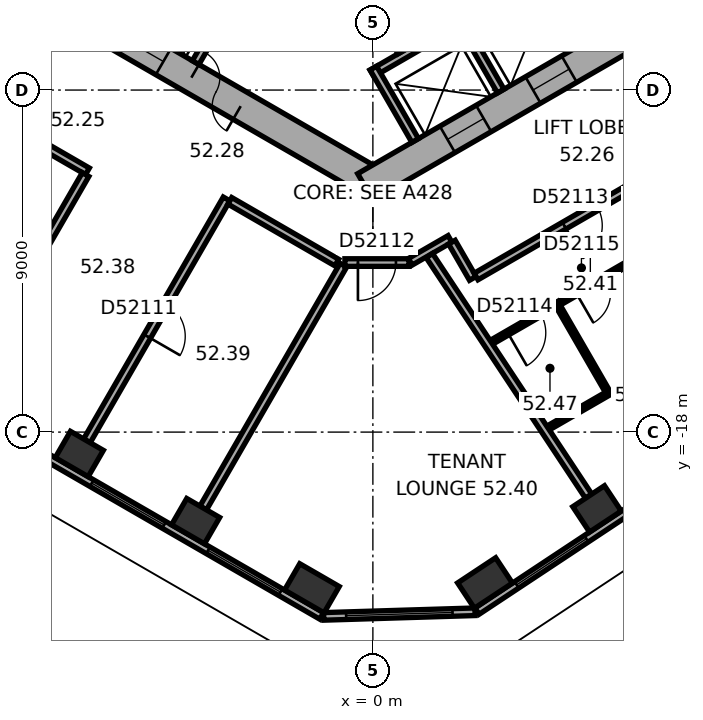
"""IFC4 building model, lengths in metres.
Left out: names, types, materials, properties, quantities, classifications, styles, units other than length and angle.
Written with IfcOpenShell. Run it as: python <this file> out.ifc"""

import sys

from ifc_helpers import new_model, si_unit, direction, frame, frame_2d, origin, origin_2d, place, context, subcontext, project, spatial, rectangle, extrude, element, fill, save


model = new_model("IFC4")
c1 = context("Model", 3, precision=1e-05, world=origin(), true_north=direction((0.0, 1.0)))
c2 = subcontext(c1, "Body", "Model", "MODEL_VIEW")
j1 = project(units=[si_unit("LENGTHUNIT", "METRE"), si_unit("PLANEANGLEUNIT", "RADIAN")], contexts=[c1])
p1 = place(None, origin())
s1 = spatial("IfcSite", under=j1, at=p1, CompositionType="ELEMENT")
p2 = place(p1, origin())
s2 = spatial("IfcBuilding", under=s1, at=p2, CompositionType="ELEMENT")
p3 = place(p2, frame((0.0, 0.0, 210.6)))
s3 = spatial("IfcBuildingStorey", under=s2, at=p3, CompositionType="ELEMENT", Elevation=210.6)
for number, where, z_axis, x_axis in (
    (1, (-7.725, -18.576, 0.0), (0.0, 0.0, 1.0), (0.866, -0.5, 0.0)),
    (2, (-4.665, -20.343, 0.0), (0.0, 0.0, 1.0), (0.866, -0.5, 0.0)),
):
    element("IfcColumn", number, at=place(p3, frame(where, z_axis=z_axis, x_axis=x_axis)), inside=s3, PredefinedType="COLUMN", context=c2, shape_type="SweptSolid", body=[
        extrude(rectangle(XDim=1.0, YDim=0.8, at=origin_2d()), origin(), (0.0, 0.0, 1.0), 3.7),
    ])
for number, where, z_axis, x_axis in (
    (3, (-1.604, -22.11, 0.0), (0.0, 0.0, 1.0), (0.866, -0.5, 0.0)),
    (4, (2.951, -21.971, 0.0), (0.0, 0.0, 1.0), (0.834, 0.552, 0.0)),
):
    element("IfcColumn", number, at=place(p3, frame(where, z_axis=z_axis, x_axis=x_axis)), inside=s3, PredefinedType="COLUMN", context=c2, shape_type="SweptSolid", body=[
        extrude(rectangle(XDim=1.2, YDim=0.8, at=origin_2d()), origin(), (0.0, 0.0, 1.0), 3.7),
    ])
p4 = place(p3, frame((5.898, -20.021, 0.0), z_axis=(0.0, 0.0, 1.0), x_axis=(0.833885822067, 0.551936985312, 0.0)))
e5 = element("IfcColumn", 5, at=p4, inside=s3, PredefinedType="COLUMN", context=c2, shape_type="SweptSolid", body=[
    extrude(rectangle(XDim=1.0, YDim=0.8, at=origin_2d()), origin(), (0.0, 0.0, 1.0), 3.7),
])
p5 = place(p3, frame((-10.1, -5.6, 0.0), z_axis=(0.0, 0.0, 1.0), x_axis=(0.866023897231, -0.500002609418, 0.0)))
e6 = element("IfcWall", 6, at=p5, inside=s3, PredefinedType="SHEAR", context=c2, shape_type="SweptSolid", body=[
    extrude(rectangle(XDim=11.894, YDim=0.8, at=frame_2d((5.947, 0.0))), origin(), (0.0, 0.0, 1.0), 3.7),
])
p6 = place(p5, frame((6.147, 0.0, 0.0)))
e7 = element("IfcOpeningElement", 7, at=p6, cuts=e6, PredefinedType="OPENING", context=c2, shape_type="SweptSolid", body=[
    extrude(rectangle(XDim=1.5, YDim=2.1, at=frame_2d((0.75, 1.05))), frame((0.0, 0.41, 0.0), z_axis=(0.0, -1.0, 0.0), x_axis=(1.0, 0.0, 0.0)), (0.0, 0.0, 1.0), 0.82),
])
p7 = place(p5, frame((1.597, 0.0, 0.0)))
e8 = element("IfcOpeningElement", 8, at=p7, cuts=e6, PredefinedType="OPENING", context=c2, shape_type="SweptSolid", body=[
    extrude(rectangle(XDim=1.1, YDim=2.1, at=frame_2d((0.55, 1.05))), frame((0.0, 0.41, 0.0), z_axis=(0.0, -1.0, 0.0), x_axis=(1.0, 0.0, 0.0)), (0.0, 0.0, 1.0), 0.82),
])
p8 = place(p5, frame((4.197, 0.0, 0.0)))
e9 = element("IfcOpeningElement", 9, at=p8, cuts=e6, PredefinedType="OPENING", context=c2, shape_type="SweptSolid", body=[
    extrude(rectangle(XDim=1.1, YDim=2.1, at=frame_2d((0.55, 1.05))), frame((0.0, 0.41, 0.0), z_axis=(0.0, -1.0, 0.0), x_axis=(1.0, 0.0, 0.0)), (0.0, 0.0, 1.0), 0.82),
])
p9 = place(p3, frame((-0.2, -11.547, 0.0), z_axis=(0.0, 0.0, 1.0), x_axis=(0.866023897231, 0.500002609418, 0.0)))
e10 = element("IfcWall", 10, at=p9, inside=s3, PredefinedType="SHEAR", context=c2, shape_type="SweptSolid", body=[
    extrude(rectangle(XDim=11.894, YDim=0.8, at=frame_2d((5.947, 0.0))), origin(), (0.0, 0.0, 1.0), 3.7),
])
p10 = place(p9, frame((2.497, 0.0, 0.0)))
e11 = element("IfcOpeningElement", 11, at=p10, cuts=e10, PredefinedType="OPENING", context=c2, shape_type="SweptSolid", body=[
    extrude(rectangle(XDim=1.1, YDim=2.1, at=frame_2d((0.55, 1.05))), frame((0.0, 0.41, 0.0), z_axis=(0.0, -1.0, 0.0), x_axis=(1.0, 0.0, 0.0)), (0.0, 0.0, 1.0), 0.82),
])
p11 = place(p9, frame((5.097, 0.0, 0.0)))
e12 = element("IfcOpeningElement", 12, at=p11, cuts=e10, PredefinedType="OPENING", context=c2, shape_type="SweptSolid", body=[
    extrude(rectangle(XDim=1.1, YDim=2.1, at=frame_2d((0.55, 1.05))), frame((0.0, 0.41, 0.0), z_axis=(0.0, -1.0, 0.0), x_axis=(1.0, 0.0, 0.0)), (0.0, 0.0, 1.0), 0.82),
])
p12 = place(p9, frame((7.697, 0.0, 0.0)))
e13 = element("IfcOpeningElement", 13, at=p12, cuts=e10, PredefinedType="OPENING", context=c2, shape_type="SweptSolid", body=[
    extrude(rectangle(XDim=1.1, YDim=2.1, at=frame_2d((0.55, 1.05))), frame((0.0, 0.41, 0.0), z_axis=(0.0, -1.0, 0.0), x_axis=(1.0, 0.0, 0.0)), (0.0, 0.0, 1.0), 0.82),
])
p13 = place(p3, frame((-17.664, -13.415, 0.0), z_axis=(0.0, 0.0, 1.0), x_axis=(0.866026555358, -0.49999800541, 0.0)))
e14 = element("IfcWall", 14, at=p13, inside=s3, PredefinedType="STANDARD", context=c2, shape_type="SweptSolid", body=[
    extrude(rectangle(XDim=18.841, YDim=0.2, at=frame_2d((9.421, 0.0))), origin(), (0.0, 0.0, 1.0), 3.7),
])
p14 = place(p13, frame((1.254, 0.0, 0.9)))
e15 = element("IfcOpeningElement", 15, at=p14, cuts=e14, PredefinedType="OPENING", context=c2, shape_type="SweptSolid", body=[
    extrude(rectangle(XDim=2.2, YDim=2.0, at=frame_2d((1.1, 1.0))), frame((0.0, 0.11, 0.0), z_axis=(0.0, -1.0, 0.0), x_axis=(1.0, 0.0, 0.0)), (0.0, 0.0, 1.0), 0.22),
])
p15 = place(p13, frame((4.788, 0.0, 0.9)))
e16 = element("IfcOpeningElement", 16, at=p15, cuts=e14, PredefinedType="OPENING", context=c2, shape_type="SweptSolid", body=[
    extrude(rectangle(XDim=2.2, YDim=2.0, at=frame_2d((1.1, 1.0))), frame((0.0, 0.11, 0.0), z_axis=(0.0, -1.0, 0.0), x_axis=(1.0, 0.0, 0.0)), (0.0, 0.0, 1.0), 0.22),
])
p16 = place(p13, frame((8.322, 0.0, 0.9)))
e17 = element("IfcOpeningElement", 17, at=p16, cuts=e14, PredefinedType="OPENING", context=c2, shape_type="SweptSolid", body=[
    extrude(rectangle(XDim=2.2, YDim=2.0, at=frame_2d((1.1, 1.0))), frame((0.0, 0.11, 0.0), z_axis=(0.0, -1.0, 0.0), x_axis=(1.0, 0.0, 0.0)), (0.0, 0.0, 1.0), 0.22),
])
p17 = place(p13, frame((11.855, 0.0, 0.9)))
e18 = element("IfcOpeningElement", 18, at=p17, cuts=e14, PredefinedType="OPENING", context=c2, shape_type="SweptSolid", body=[
    extrude(rectangle(XDim=2.2, YDim=2.0, at=frame_2d((1.1, 1.0))), frame((0.0, 0.11, 0.0), z_axis=(0.0, -1.0, 0.0), x_axis=(1.0, 0.0, 0.0)), (0.0, 0.0, 1.0), 0.22),
])
p18 = place(p13, frame((15.389, 0.0, 0.9)))
e19 = element("IfcOpeningElement", 19, at=p18, cuts=e14, PredefinedType="OPENING", context=c2, shape_type="SweptSolid", body=[
    extrude(rectangle(XDim=2.2, YDim=2.0, at=frame_2d((1.1, 1.0))), frame((0.0, 0.11, 0.0), z_axis=(0.0, -1.0, 0.0), x_axis=(1.0, 0.0, 0.0)), (0.0, 0.0, 1.0), 0.22),
])
p19 = place(p3, frame((-1.294, -22.849, 0.0), z_axis=(0.0, 0.0, 1.0), x_axis=(0.999533952558, 0.030526671678, 0.0)))
e20 = element("IfcWall", 20, at=p19, inside=s3, PredefinedType="STANDARD", context=c2, shape_type="SweptSolid", body=[
    extrude(rectangle(XDim=3.983, YDim=0.2, at=frame_2d((1.991, 0.0))), origin(), (0.0, 0.0, 1.0), 3.7),
])
p20 = place(p19, frame((0.591, 0.0, 0.9)))
e21 = element("IfcOpeningElement", 21, at=p20, cuts=e20, PredefinedType="OPENING", context=c2, shape_type="SweptSolid", body=[
    extrude(rectangle(XDim=2.8, YDim=2.0, at=frame_2d((1.4, 1.0))), frame((0.0, 0.11, 0.0), z_axis=(0.0, -1.0, 0.0), x_axis=(1.0, 0.0, 0.0)), (0.0, 0.0, 1.0), 0.22),
])
p21 = place(p3, frame((2.739, -22.711, 0.0), z_axis=(0.0, 0.0, 1.0), x_axis=(0.833885723098, 0.551937134838, 0.0)))
e22 = element("IfcWall", 22, at=p21, inside=s3, PredefinedType="STANDARD", context=c2, shape_type="SweptSolid", body=[
    extrude(rectangle(XDim=18.841, YDim=0.2, at=frame_2d((9.421, 0.0))), origin(), (0.0, 0.0, 1.0), 3.7),
])
p22 = place(p21, frame((1.252, 0.0, 0.9)))
e23 = element("IfcOpeningElement", 23, at=p22, cuts=e22, PredefinedType="OPENING", context=c2, shape_type="SweptSolid", body=[
    extrude(rectangle(XDim=2.2, YDim=2.0, at=frame_2d((1.1, 1.0))), frame((0.0, 0.11, 0.0), z_axis=(0.0, -1.0, 0.0), x_axis=(1.0, 0.0, 0.0)), (0.0, 0.0, 1.0), 0.22),
])
p23 = place(p21, frame((4.786, 0.0, 0.9)))
e24 = element("IfcOpeningElement", 24, at=p23, cuts=e22, PredefinedType="OPENING", context=c2, shape_type="SweptSolid", body=[
    extrude(rectangle(XDim=2.2, YDim=2.0, at=frame_2d((1.1, 1.0))), frame((0.0, 0.11, 0.0), z_axis=(0.0, -1.0, 0.0), x_axis=(1.0, 0.0, 0.0)), (0.0, 0.0, 1.0), 0.22),
])
p24 = place(p21, frame((8.32, 0.0, 0.9)))
e25 = element("IfcOpeningElement", 25, at=p24, cuts=e22, PredefinedType="OPENING", context=c2, shape_type="SweptSolid", body=[
    extrude(rectangle(XDim=2.2, YDim=2.0, at=frame_2d((1.1, 1.0))), frame((0.0, 0.11, 0.0), z_axis=(0.0, -1.0, 0.0), x_axis=(1.0, 0.0, 0.0)), (0.0, 0.0, 1.0), 0.22),
])
p25 = place(p21, frame((11.854, 0.0, 0.9)))
e26 = element("IfcOpeningElement", 26, at=p25, cuts=e22, PredefinedType="OPENING", context=c2, shape_type="SweptSolid", body=[
    extrude(rectangle(XDim=2.2, YDim=2.0, at=frame_2d((1.1, 1.0))), frame((0.0, 0.11, 0.0), z_axis=(0.0, -1.0, 0.0), x_axis=(1.0, 0.0, 0.0)), (0.0, 0.0, 1.0), 0.22),
])
p26 = place(p21, frame((15.387, 0.0, 0.9)))
e27 = element("IfcOpeningElement", 27, at=p26, cuts=e22, PredefinedType="OPENING", context=c2, shape_type="SweptSolid", body=[
    extrude(rectangle(XDim=2.2, YDim=2.0, at=frame_2d((1.1, 1.0))), frame((0.0, 0.11, 0.0), z_axis=(0.0, -1.0, 0.0), x_axis=(1.0, 0.0, 0.0)), (0.0, 0.0, 1.0), 0.22),
])
p27 = place(p3, frame((-3.563, -6.372, 0.0), z_axis=(0.0, 0.0, 1.0), x_axis=(-0.499994660107, -0.866028486751, 0.0)))
e28 = element("IfcWall", 28, at=p27, inside=s3, PredefinedType="PARTITIONING", context=c2, shape_type="SweptSolid", body=[
    extrude(rectangle(XDim=2.2, YDim=0.2, at=frame_2d((1.1, 0.0))), origin(), (0.0, 0.0, 1.0), 3.35),
])
p28 = place(p3, frame((-0.024, -8.559, 0.0), z_axis=(0.0, 0.0, 1.0), x_axis=(0.866026010844, 0.49999894854, 0.0)))
e29 = element("IfcWall", 29, at=p28, inside=s3, PredefinedType="PARTITIONING", context=c2, shape_type="SweptSolid", body=[
    extrude(rectangle(XDim=8.0, YDim=0.2, at=frame_2d((4.0, 0.0))), origin(), (0.0, 0.0, 1.0), 3.35),
])
for number, where, z_axis, x_axis in (
    (30, (0.013, -8.422, 0.0), (0.0, 0.0, 1.0), (0.5, -0.866, 0.0)),
    (31, (2.264, -7.122, 0.0), (0.0, 0.0, 1.0), (0.5, -0.866, 0.0)),
):
    element("IfcWall", number, at=place(p3, frame(where, z_axis=z_axis, x_axis=x_axis)), inside=s3, PredefinedType="PARTITIONING", context=c2, shape_type="SweptSolid", body=[
        extrude(rectangle(XDim=2.2, YDim=0.2, at=frame_2d((1.1, 0.0))), origin(), (0.0, 0.0, 1.0), 3.35),
    ])
p29 = place(p3, frame((-1.558, -3.902, 0.0), z_axis=(0.0, 0.0, 1.0), x_axis=(0.499977259774, -0.866038532462, 0.0)))
e32 = element("IfcWall", 32, at=p29, inside=s3, PredefinedType="SHEAR", context=c2, shape_type="SweptSolid", body=[
    extrude(rectangle(XDim=4.7, YDim=0.3, at=frame_2d((2.35, 0.0))), origin(), (0.0, 0.0, 1.0), 3.35),
])
p30 = place(p29, frame((0.8, 0.0, 0.0)))
e33 = element("IfcOpeningElement", 33, at=p30, cuts=e32, PredefinedType="OPENING", context=c2, shape_type="SweptSolid", body=[
    extrude(rectangle(XDim=1.2, YDim=2.1, at=frame_2d((0.6, 1.05))), frame((0.0, 0.16, 0.0), z_axis=(0.0, -1.0, 0.0), x_axis=(1.0, 0.0, 0.0)), (0.0, 0.0, 1.0), 0.32),
])
p31 = place(p3, frame((-11.551, -8.805, 0.0), z_axis=(0.0, 0.0, 1.0), x_axis=(0.866038310922, -0.499977643516, 0.0)))
e34 = element("IfcWall", 34, at=p31, inside=s3, PredefinedType="PARTITIONING", context=c2, shape_type="SweptSolid", body=[
    extrude(rectangle(XDim=4.665, YDim=0.2, at=frame_2d((2.333, 0.0))), origin(), (0.0, 0.0, 1.0), 3.35),
])
p32 = place(p3, frame((-10.585, -16.463, 0.0), z_axis=(0.0, 0.0, 1.0), x_axis=(0.499993802756, 0.866028981735, 0.0)))
e35 = element("IfcWall", 35, at=p32, inside=s3, PredefinedType="PARTITIONING", context=c2, shape_type="SweptSolid", body=[
    extrude(rectangle(XDim=6.049, YDim=0.2, at=frame_2d((3.024, 0.0))), origin(), (0.0, 0.0, 1.0), 2.65),
])
p33 = place(p32, frame((2.524, 0.0, 0.0)))
e36 = element("IfcOpeningElement", 36, at=p33, cuts=e35, PredefinedType="OPENING", context=c2, shape_type="SweptSolid", body=[
    extrude(rectangle(XDim=1.0, YDim=2.1, at=frame_2d((0.5, 1.05))), frame((0.0, 0.11, 0.0), z_axis=(0.0, -1.0, 0.0), x_axis=(1.0, 0.0, 0.0)), (0.0, 0.0, 1.0), 0.22),
])
p34 = place(p3, frame((-7.525, -18.23, 0.0), z_axis=(0.0, 0.0, 1.0), x_axis=(0.499983153418, 0.866035129944, 0.0)))
e37 = element("IfcWall", 37, at=p34, inside=s3, PredefinedType="PARTITIONING", context=c2, shape_type="SweptSolid", body=[
    extrude(rectangle(XDim=7.35, YDim=0.2, at=frame_2d((3.675, 0.0))), origin(), (0.0, 0.0, 1.0), 3.35),
])
p35 = place(p34, frame((3.175, 0.0, 0.0)))
e38 = element("IfcOpeningElement", 38, at=p35, cuts=e37, PredefinedType="OPENING", context=c2, shape_type="SweptSolid", body=[
    extrude(rectangle(XDim=1.0, YDim=2.1, at=frame_2d((0.5, 1.05))), frame((0.0, 0.11, 0.0), z_axis=(0.0, -1.0, 0.0), x_axis=(1.0, 0.0, 0.0)), (0.0, 0.0, 1.0), 0.22),
])
p36 = place(p3, frame((-4.465, -19.997, 0.0), z_axis=(0.0, 0.0, 1.0), x_axis=(0.500011802906, 0.866018589266, 0.0)))
e39 = element("IfcWall", 39, at=p36, inside=s3, PredefinedType="PARTITIONING", context=c2, shape_type="SweptSolid", body=[
    extrude(rectangle(XDim=7.377, YDim=0.2, at=frame_2d((3.688, 0.0))), origin(), (0.0, 0.0, 1.0), 3.35),
])
p37 = place(p3, frame((-3.763, -11.915, 0.0), z_axis=(0.0, 0.0, 1.0), x_axis=(0.866037915695, -0.499978328108, 0.0)))
e40 = element("IfcWall", 40, at=p37, inside=s3, PredefinedType="PARTITIONING", context=c2, shape_type="SweptSolid", body=[
    extrude(rectangle(XDim=3.249, YDim=0.2, at=frame_2d((1.625, 0.0))), origin(), (0.0, 0.0, 1.0), 3.35),
])
p38 = place(p3, frame((-0.736, -13.539, 0.0), z_axis=(0.0, 0.0, 1.0), x_axis=(1.0, 0.0, 0.0)))
e41 = element("IfcWall", 41, at=p38, inside=s3, PredefinedType="PARTITIONING", context=c2, shape_type="SweptSolid", body=[
    extrude(rectangle(XDim=1.686, YDim=0.2, at=frame_2d((0.843, 0.0))), origin(), (0.0, 0.0, 1.0), 3.35),
])
p39 = place(p38, frame((0.343, 0.0, 0.0)))
e42 = element("IfcOpeningElement", 42, at=p39, cuts=e41, PredefinedType="OPENING", context=c2, shape_type="SweptSolid", body=[
    extrude(rectangle(XDim=1.0, YDim=2.1, at=frame_2d((0.5, 1.05))), frame((0.0, 0.11, 0.0), z_axis=(0.0, -1.0, 0.0), x_axis=(1.0, 0.0, 0.0)), (0.0, 0.0, 1.0), 0.22),
])
p40 = place(p3, frame((0.985, -13.519, 0.0), z_axis=(0.0, 0.0, 1.0), x_axis=(0.866054082991, 0.499950322867, 0.0)))
e43 = element("IfcWall", 43, at=p40, inside=s3, PredefinedType="PARTITIONING", context=c2, shape_type="SweptSolid", body=[
    extrude(rectangle(XDim=1.206, YDim=0.2, at=frame_2d((0.603, 0.0))), origin(), (0.0, 0.0, 1.0), 3.35),
])
p41 = place(p3, frame((2.079, -13.003, 0.0), z_axis=(0.0, 0.0, 1.0), x_axis=(0.500074377092, -0.865982457891, 0.0)))
e44 = element("IfcWall", 44, at=p41, inside=s3, PredefinedType="PARTITIONING", context=c2, shape_type="SweptSolid", body=[
    extrude(rectangle(XDim=1.101, YDim=0.2, at=frame_2d((0.55, 0.0))), origin(), (0.0, 0.0, 1.0), 3.35),
])
p42 = place(p3, frame((2.716, -13.906, 0.0), z_axis=(0.0, 0.0, 1.0), x_axis=(0.866040290674, 0.499974214264, 0.0)))
e45 = element("IfcWall", 45, at=p42, inside=s3, PredefinedType="PARTITIONING", context=c2, shape_type="SweptSolid", body=[
    extrude(rectangle(XDim=8.702, YDim=0.2, at=frame_2d((4.351, 0.0))), origin(), (0.0, 0.0, 1.0), 3.35),
])
p43 = place(p42, frame((2.679, 0.0, 0.0)))
e46 = element("IfcOpeningElement", 46, at=p43, cuts=e45, PredefinedType="OPENING", context=c2, shape_type="SweptSolid", body=[
    extrude(rectangle(XDim=1.0, YDim=2.1, at=frame_2d((0.5, 1.05))), frame((0.0, 0.11, 0.0), z_axis=(0.0, -1.0, 0.0), x_axis=(1.0, 0.0, 0.0)), (0.0, 0.0, 1.0), 0.22),
])
p44 = place(p3, frame((3.117, -15.638, 0.0), z_axis=(0.0, 0.0, 1.0), x_axis=(0.866031365477, 0.499989673903, 0.0)))
e47 = element("IfcWall", 47, at=p44, inside=s3, PredefinedType="PARTITIONING", context=c2, shape_type="SweptSolid", body=[
    extrude(rectangle(XDim=6.881, YDim=0.12, at=frame_2d((3.44, 0.0))), origin(), (0.0, 0.0, 1.0), 3.35),
])
p45 = place(p44, frame((0.5, 0.0, 0.0)))
e48 = element("IfcOpeningElement", 48, at=p45, cuts=e47, PredefinedType="OPENING", context=c2, shape_type="SweptSolid", body=[
    extrude(rectangle(XDim=1.0, YDim=2.1, at=frame_2d((0.5, 1.05))), frame((0.0, 0.07, 0.0), z_axis=(0.0, -1.0, 0.0), x_axis=(1.0, 0.0, 0.0)), (0.0, 0.0, 1.0), 0.14),
])
p46 = place(p44, frame((2.583, 0.0, 0.0)))
e49 = element("IfcOpeningElement", 49, at=p46, cuts=e47, PredefinedType="OPENING", context=c2, shape_type="SweptSolid", body=[
    extrude(rectangle(XDim=0.9, YDim=2.1, at=frame_2d((0.45, 1.05))), frame((0.0, 0.07, 0.0), z_axis=(0.0, -1.0, 0.0), x_axis=(1.0, 0.0, 0.0)), (0.0, 0.0, 1.0), 0.14),
])
p47 = place(p44, frame((5.023, 0.0, 0.0)))
e50 = element("IfcOpeningElement", 50, at=p47, cuts=e47, PredefinedType="OPENING", context=c2, shape_type="SweptSolid", body=[
    extrude(rectangle(XDim=0.9, YDim=2.1, at=frame_2d((0.45, 1.05))), frame((0.0, 0.07, 0.0), z_axis=(0.0, -1.0, 0.0), x_axis=(1.0, 0.0, 0.0)), (0.0, 0.0, 1.0), 0.14),
])
p48 = place(p3, frame((4.61, -17.893, 0.0), z_axis=(0.0, 0.0, 1.0), x_axis=(0.866023842607, 0.500002704028, 0.0)))
e51 = element("IfcWall", 51, at=p48, inside=s3, PredefinedType="PARTITIONING", context=c2, shape_type="SweptSolid", body=[
    extrude(rectangle(XDim=1.835, YDim=0.12, at=frame_2d((0.917, 0.0))), origin(), (0.0, 0.0, 1.0), 3.35),
])
p49 = place(p3, frame((5.677, -19.687, 0.0), z_axis=(0.0, 0.0, 1.0), x_axis=(-0.551936619203, 0.833886064389, 0.0)))
e52 = element("IfcWall", 52, at=p49, inside=s3, PredefinedType="PARTITIONING", context=c2, shape_type="SweptSolid", body=[
    extrude(rectangle(XDim=7.592, YDim=0.2, at=frame_2d((3.796, 0.0))), origin(), (0.0, 0.0, 1.0), 3.35),
])
p50 = place(p3, frame((6.169, -16.924, 0.0), z_axis=(0.0, 0.0, 1.0), x_axis=(-0.500047388771, 0.865998042136, 0.0)))
e53 = element("IfcWall", 53, at=p50, inside=s3, PredefinedType="PARTITIONING", context=c2, shape_type="SweptSolid", body=[
    extrude(rectangle(XDim=2.58, YDim=0.12, at=frame_2d((1.29, 0.0))), origin(), (0.0, 0.0, 1.0), 3.35),
])
p51 = place(p17, origin())
e54 = element("IfcWindow", 54, at=p51, inside=s3, PartitioningType="SINGLE_PANEL", PredefinedType="WINDOW", context=c2, shape_type="SweptSolid", body=[
    extrude(rectangle(XDim=2.2, YDim=2.0, at=frame_2d((1.1, 1.0))), frame((0.0, 0.03, 0.0), z_axis=(0.0, -1.0, 0.0), x_axis=(1.0, 0.0, 0.0)), (0.0, 0.0, 1.0), 0.06),
])
fill(e18, e54)
p52 = place(p18, origin())
e55 = element("IfcWindow", 55, at=p52, inside=s3, PartitioningType="SINGLE_PANEL", PredefinedType="WINDOW", context=c2, shape_type="SweptSolid", body=[
    extrude(rectangle(XDim=2.2, YDim=2.0, at=frame_2d((1.1, 1.0))), frame((0.0, 0.03, 0.0), z_axis=(0.0, -1.0, 0.0), x_axis=(1.0, 0.0, 0.0)), (0.0, 0.0, 1.0), 0.06),
])
fill(e19, e55)
p53 = place(p20, origin())
e56 = element("IfcWindow", 56, at=p53, inside=s3, PartitioningType="SINGLE_PANEL", PredefinedType="WINDOW", context=c2, shape_type="SweptSolid", body=[
    extrude(rectangle(XDim=2.8, YDim=2.0, at=frame_2d((1.4, 1.0))), frame((0.0, 0.03, 0.0), z_axis=(0.0, -1.0, 0.0), x_axis=(1.0, 0.0, 0.0)), (0.0, 0.0, 1.0), 0.06),
])
fill(e21, e56)
p54 = place(p22, origin())
e57 = element("IfcWindow", 57, at=p54, inside=s3, PartitioningType="SINGLE_PANEL", PredefinedType="WINDOW", context=c2, shape_type="SweptSolid", body=[
    extrude(rectangle(XDim=2.2, YDim=2.0, at=frame_2d((1.1, 1.0))), frame((0.0, 0.03, 0.0), z_axis=(0.0, -1.0, 0.0), x_axis=(1.0, 0.0, 0.0)), (0.0, 0.0, 1.0), 0.06),
])
fill(e23, e57)
p55 = place(p6, origin())
e58 = element("IfcDoor", 58, at=p55, inside=s3, OperationType="DOUBLE_DOOR_SINGLE_SWING", PredefinedType="DOOR", context=c2, shape_type="SweptSolid", body=[
    extrude(rectangle(XDim=1.5, YDim=2.1, at=frame_2d((0.75, 1.05))), frame((0.0, 0.025, 0.0), z_axis=(0.0, -1.0, 0.0), x_axis=(1.0, 0.0, 0.0)), (0.0, 0.0, 1.0), 0.05),
])
fill(e7, e58)
p56 = place(p8, origin())
e59 = element("IfcDoor", 59, at=p56, inside=s3, OperationType="DOUBLE_DOOR_SLIDING", PredefinedType="DOOR", context=c2, shape_type="SweptSolid", body=[
    extrude(rectangle(XDim=1.1, YDim=2.1, at=frame_2d((0.55, 1.05))), frame((0.0, 0.025, 0.0), z_axis=(0.0, -1.0, 0.0), x_axis=(1.0, 0.0, 0.0)), (0.0, 0.0, 1.0), 0.05),
])
fill(e9, e59)
p57 = place(p10, origin())
e60 = element("IfcDoor", 60, at=p57, inside=s3, OperationType="DOUBLE_DOOR_SLIDING", PredefinedType="DOOR", context=c2, shape_type="SweptSolid", body=[
    extrude(rectangle(XDim=1.1, YDim=2.1, at=frame_2d((0.55, 1.05))), frame((0.0, 0.025, 0.0), z_axis=(0.0, -1.0, 0.0), x_axis=(1.0, 0.0, 0.0)), (0.0, 0.0, 1.0), 0.05),
])
fill(e11, e60)
p58 = place(p11, origin())
e61 = element("IfcDoor", 61, at=p58, inside=s3, OperationType="DOUBLE_DOOR_SLIDING", PredefinedType="DOOR", context=c2, shape_type="SweptSolid", body=[
    extrude(rectangle(XDim=1.1, YDim=2.1, at=frame_2d((0.55, 1.05))), frame((0.0, 0.025, 0.0), z_axis=(0.0, -1.0, 0.0), x_axis=(1.0, 0.0, 0.0)), (0.0, 0.0, 1.0), 0.05),
])
fill(e12, e61)
p59 = place(p35, origin())
e62 = element("IfcDoor", 62, at=p59, inside=s3, OperationType="SINGLE_SWING_LEFT", PredefinedType="DOOR", context=c2, shape_type="SweptSolid", body=[
    extrude(rectangle(XDim=1.0, YDim=2.1, at=frame_2d((0.5, 1.05))), frame((0.0, 0.025, 0.0), z_axis=(0.0, -1.0, 0.0), x_axis=(1.0, 0.0, 0.0)), (0.0, 0.0, 1.0), 0.05),
])
fill(e38, e62)
p60 = place(p39, origin())
e63 = element("IfcDoor", 63, at=p60, inside=s3, OperationType="SINGLE_SWING_LEFT", PredefinedType="DOOR", context=c2, shape_type="SweptSolid", body=[
    extrude(rectangle(XDim=1.0, YDim=2.1, at=frame_2d((0.5, 1.05))), frame((0.0, 0.025, 0.0), z_axis=(0.0, -1.0, 0.0), x_axis=(1.0, 0.0, 0.0)), (0.0, 0.0, 1.0), 0.05),
])
fill(e42, e63)
p61 = place(p43, origin())
e64 = element("IfcDoor", 64, at=p61, inside=s3, OperationType="SINGLE_SWING_LEFT", PredefinedType="DOOR", context=c2, shape_type="SweptSolid", body=[
    extrude(rectangle(XDim=1.0, YDim=2.1, at=frame_2d((0.5, 1.05))), frame((0.0, 0.025, 0.0), z_axis=(0.0, -1.0, 0.0), x_axis=(1.0, 0.0, 0.0)), (0.0, 0.0, 1.0), 0.05),
])
fill(e46, e64)
p62 = place(p45, origin())
e65 = element("IfcDoor", 65, at=p62, inside=s3, OperationType="SINGLE_SWING_LEFT", PredefinedType="DOOR", context=c2, shape_type="SweptSolid", body=[
    extrude(rectangle(XDim=1.0, YDim=2.1, at=frame_2d((0.5, 1.05))), frame((0.0, 0.025, 0.0), z_axis=(0.0, -1.0, 0.0), x_axis=(1.0, 0.0, 0.0)), (0.0, 0.0, 1.0), 0.05),
])
fill(e48, e65)
p63 = place(p46, origin())
e66 = element("IfcDoor", 66, at=p63, inside=s3, OperationType="SINGLE_SWING_LEFT", PredefinedType="DOOR", context=c2, shape_type="SweptSolid", body=[
    extrude(rectangle(XDim=0.9, YDim=2.1, at=frame_2d((0.45, 1.05))), frame((0.0, 0.025, 0.0), z_axis=(0.0, -1.0, 0.0), x_axis=(1.0, 0.0, 0.0)), (0.0, 0.0, 1.0), 0.05),
])
fill(e49, e66)
save(model, sys.argv[1])
